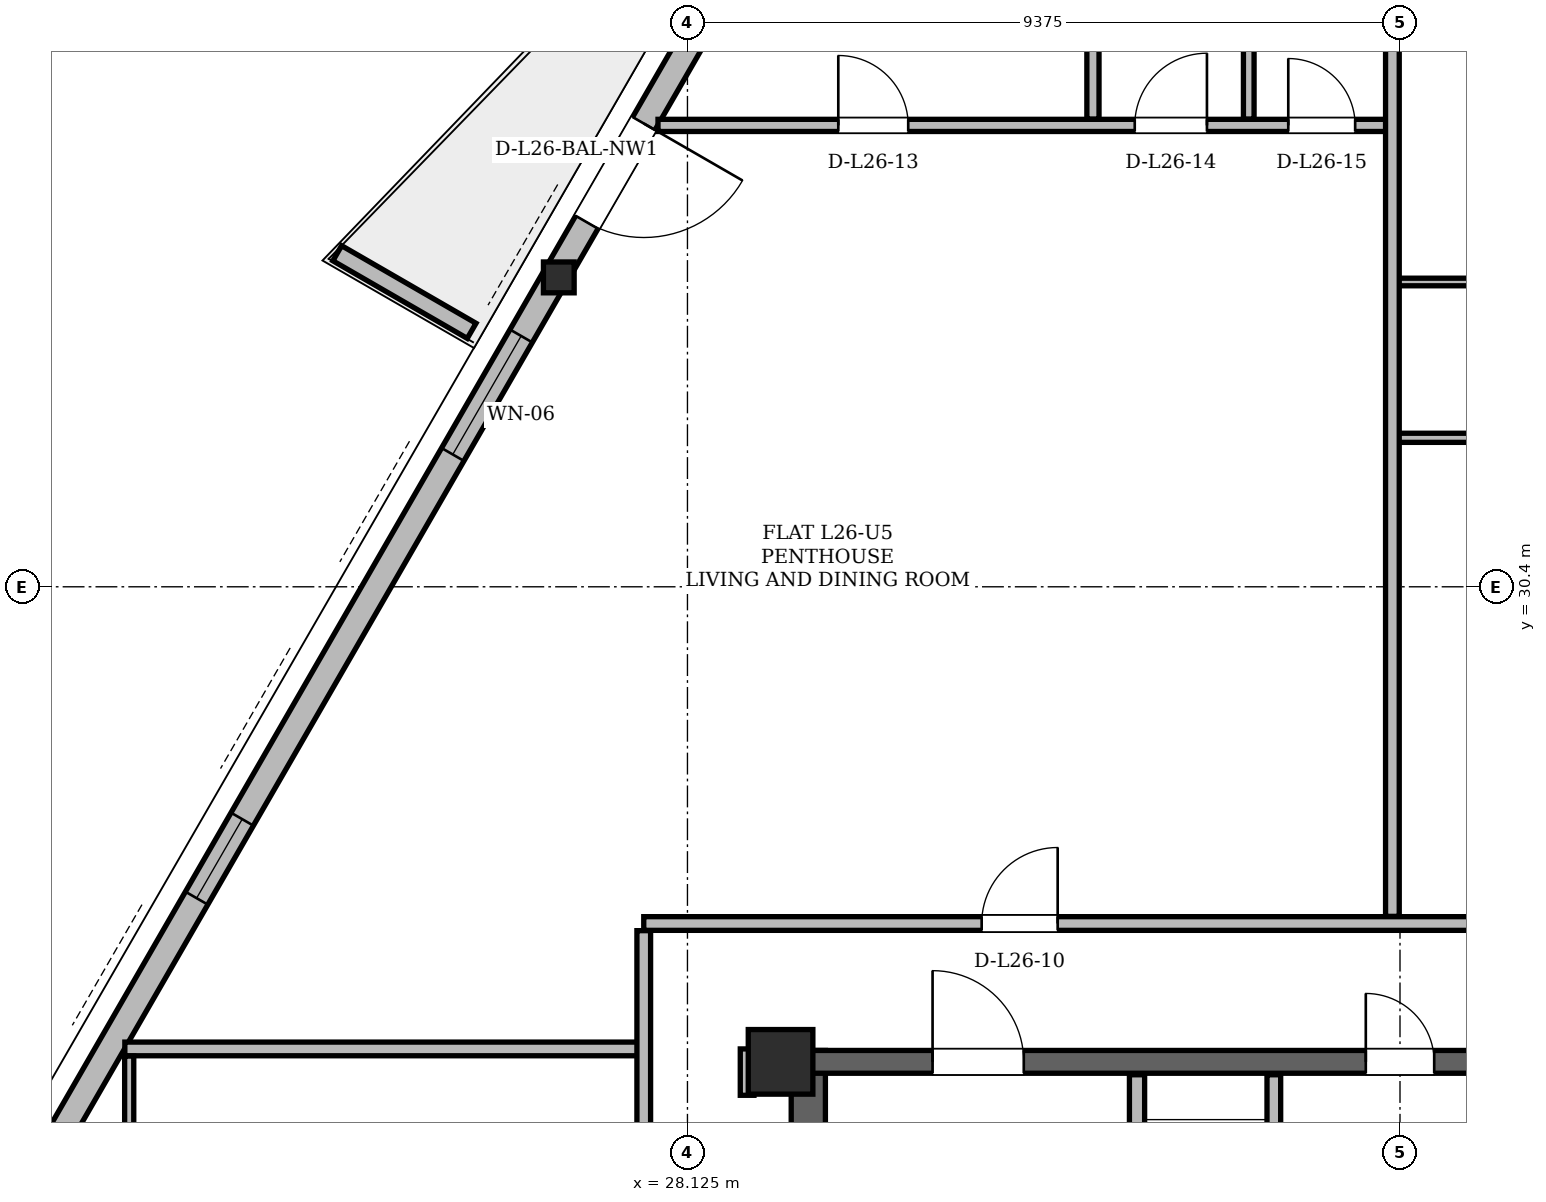
"""IFC4 building model, lengths in metres.
Left out: names, types, materials, properties, quantities, classifications, styles, units other than length and angle.
Written with IfcOpenShell. Run it as: python <this file> out.ifc"""

import sys

from ifc_helpers import new_model, si_unit, direction, frame, frame_2d, origin, origin_2d, place, context, subcontext, project, spatial, polyline, rectangle, hollow_rectangle, i_section, outline, extrude, element, fill, save


model = new_model("IFC4")
c1 = context("Model", 3, precision=1e-05, world=origin(), true_north=direction((0.0, 1.0)))
c2 = subcontext(c1, "Body", "Model", "MODEL_VIEW")
j1 = project(units=[si_unit("LENGTHUNIT", "METRE"), si_unit("PLANEANGLEUNIT", "RADIAN")], contexts=[c1])
p1 = place(None, origin())
s1 = spatial("IfcSite", under=j1, at=p1, CompositionType="ELEMENT")
p2 = place(p1, origin())
s2 = spatial("IfcBuilding", under=s1, at=p2, CompositionType="ELEMENT")
p3 = place(p2, frame((0.0, 0.0, 100.5)))
s3 = spatial("IfcBuildingStorey", under=s2, at=p3, CompositionType="ELEMENT", Elevation=100.5)
p4 = place(p3, frame((29.35, 24.15, 0.0), z_axis=(0.0, 0.0, 1.0), x_axis=(1.0, 0.0, 0.0)))
e1 = element("IfcColumn", 1, at=p4, inside=s3, PredefinedType="COLUMN", context=c2, shape_type="SweptSolid", body=[
    extrude(hollow_rectangle(XDim=0.85, YDim=0.85, WallThickness=0.07, at=origin_2d()), origin(), (0.0, 0.0, 1.0), 3.6),
])
p5 = place(p3, frame((26.391, 34.485, 0.004), z_axis=(0.023176047894, -0.00835968883, 0.999696447131), x_axis=(0.339305503404, 0.940676233015, 0.0)))
e2 = element("IfcColumn", 2, at=p5, inside=s3, PredefinedType="COLUMN", context=c2, shape_type="SweptSolid", body=[
    extrude(i_section(OverallWidth=0.404, OverallDepth=0.406, WebThickness=0.027, FlangeThickness=0.044, at=origin_2d()), origin(), (0.0, 0.0, 1.0), 3.592),
])
p6 = place(p3, frame((29.715, 11.0, 0.0), z_axis=(0.0, 0.0, 1.0), x_axis=(0.0, 1.0, 0.0)))
e3 = element("IfcWall", 3, at=p6, inside=s3, PredefinedType="SHEAR", context=c2, shape_type="SweptSolid", body=[
    extrude(rectangle(XDim=13.3, YDim=0.45, at=frame_2d((6.65, 0.0))), origin(), (0.0, 0.0, 1.0), 3.36),
])
p7 = place(p3, frame((29.65, 24.15, 0.0), z_axis=(0.0, 0.0, 1.0), x_axis=(1.0, 0.0, 0.0)))
e4 = element("IfcWall", 4, at=p7, inside=s3, PredefinedType="SHEAR", context=c2, shape_type="SweptSolid", body=[
    extrude(rectangle(XDim=15.7, YDim=0.3, at=frame_2d((7.85, 0.0))), origin(), (0.0, 0.0, 1.0), 3.36),
])
p8 = place(p7, frame((1.7, 0.0, 0.0)))
e5 = element("IfcOpeningElement", 5, at=p8, cuts=e4, PredefinedType="OPENING", context=c2, shape_type="SweptSolid", body=[
    extrude(rectangle(XDim=1.2, YDim=2.2, at=frame_2d((0.6, 1.1))), frame((0.0, 0.15, 0.0), z_axis=(0.0, -1.0, 0.0), x_axis=(1.0, 0.0, 0.0)), (0.0, 0.0, 1.0), 0.3),
])
p9 = place(p7, frame((12.8, 0.0, 0.0)))
e6 = element("IfcOpeningElement", 6, at=p9, cuts=e4, PredefinedType="OPENING", context=c2, shape_type="SweptSolid", body=[
    extrude(rectangle(XDim=1.2, YDim=2.2, at=frame_2d((0.6, 1.1))), frame((0.0, 0.15, 0.0), z_axis=(0.0, -1.0, 0.0), x_axis=(1.0, 0.0, 0.0)), (0.0, 0.0, 1.0), 0.3),
])
p10 = place(p7, frame((7.4, 0.0, 0.0)))
e7 = element("IfcOpeningElement", 7, at=p10, cuts=e4, PredefinedType="OPENING", context=c2, shape_type="SweptSolid", body=[
    extrude(rectangle(XDim=0.9, YDim=2.05, at=frame_2d((0.45, 1.025))), frame((0.0, 0.15, 0.0), z_axis=(0.0, -1.0, 0.0), x_axis=(1.0, 0.0, 0.0)), (0.0, 0.0, 1.0), 0.3),
])
p11 = place(p3, frame((31.568, 43.453, 0.0), z_axis=(0.0, 0.0, 1.0), x_axis=(-0.500002056916, -0.86602421622, 0.0)))
e8 = element("IfcWall", 8, at=p11, inside=s3, PredefinedType="SOLIDWALL", context=c2, shape_type="SweptSolid", body=[
    extrude(rectangle(XDim=34.516, YDim=0.34, at=frame_2d((17.258, 0.0))), origin(), (0.0, 0.0, 1.0), 2.578),
])
p12 = place(p11, frame((8.034, 0.0, 0.0)))
e9 = element("IfcOpeningElement", 9, at=p12, cuts=e8, PredefinedType="OPENING", context=c2, shape_type="SweptSolid", body=[
    extrude(rectangle(XDim=1.5, YDim=2.2, at=frame_2d((0.75, 1.1))), frame((0.0, 0.17, 0.0), z_axis=(0.0, -1.0, 0.0), x_axis=(1.0, 0.0, 0.0)), (0.0, 0.0, 1.0), 0.34),
])
p13 = place(p11, frame((26.647, 0.0, 0.0)))
e10 = element("IfcOpeningElement", 10, at=p13, cuts=e8, PredefinedType="OPENING", context=c2, shape_type="SweptSolid", body=[
    extrude(rectangle(XDim=1.5, YDim=2.2, at=frame_2d((0.75, 1.1))), frame((0.0, 0.17, 0.0), z_axis=(0.0, -1.0, 0.0), x_axis=(1.0, 0.0, 0.0)), (0.0, 0.0, 1.0), 0.34),
])
p14 = place(p11, frame((31.672, 0.0, 0.85)))
e11 = element("IfcOpeningElement", 11, at=p14, cuts=e8, PredefinedType="OPENING", context=c2, shape_type="SweptSolid", body=[
    extrude(rectangle(XDim=1.6, YDim=1.618, at=frame_2d((0.8, 0.809))), frame((0.0, 0.17, 0.0), z_axis=(0.0, -1.0, 0.0), x_axis=(1.0, 0.0, 0.0)), (0.0, 0.0, 1.0), 0.34),
])
p15 = place(p11, frame((11.262, 0.0, 0.85)))
e12 = element("IfcOpeningElement", 12, at=p15, cuts=e8, PredefinedType="OPENING", context=c2, shape_type="SweptSolid", body=[
    extrude(rectangle(XDim=1.8, YDim=1.618, at=frame_2d((0.9, 0.809))), frame((0.0, 0.17, 0.0), z_axis=(0.0, -1.0, 0.0), x_axis=(1.0, 0.0, 0.0)), (0.0, 0.0, 1.0), 0.34),
])
p16 = place(p11, frame((18.602, 0.0, 0.85)))
e13 = element("IfcOpeningElement", 13, at=p16, cuts=e8, PredefinedType="OPENING", context=c2, shape_type="SweptSolid", body=[
    extrude(rectangle(XDim=1.2, YDim=1.48, at=frame_2d((0.6, 0.74))), frame((0.0, 0.17, 0.0), z_axis=(0.0, -1.0, 0.0), x_axis=(1.0, 0.0, 0.0)), (0.0, 0.0, 1.0), 0.34),
])
p17 = place(p11, frame((1.763, 0.0, 0.85)))
e14 = element("IfcOpeningElement", 14, at=p17, cuts=e8, PredefinedType="OPENING", context=c2, shape_type="SweptSolid", body=[
    extrude(rectangle(XDim=1.6, YDim=1.618, at=frame_2d((0.8, 0.809))), frame((0.0, 0.17, 0.0), z_axis=(0.0, -1.0, 0.0), x_axis=(1.0, 0.0, 0.0)), (0.0, 0.0, 1.0), 0.34),
])
p18 = place(p3, frame((25.285, 33.767, 0.0), z_axis=(0.0, 0.0, 1.0), x_axis=(-0.866012356593, 0.500022597718, 0.0)))
e15 = element("IfcWall", 15, at=p18, inside=s3, PredefinedType="PARAPET", context=c2, shape_type="SweptSolid", body=[
    extrude(outline(polyline([(0.0, 0.0), (2.042, 0.0), (2.042, 1.1), (0.0, 1.32), (0.0, 0.0)])), frame((0.0, 0.115, 0.0), z_axis=(0.0, -1.0, 0.0), x_axis=(1.0, 0.0, 0.0)), (0.0, 0.0, 1.0), 0.23),
])
p19 = place(p3, frame((34.04, 19.48, 0.0), z_axis=(0.0, 0.0, 1.0), x_axis=(0.0, 1.0, 0.0)))
e16 = element("IfcWall", 16, at=p19, inside=s3, PredefinedType="PARTITIONING", context=c2, shape_type="SweptSolid", body=[
    extrude(rectangle(XDim=4.5, YDim=0.2, at=frame_2d((2.25, 0.0))), origin(), (0.0, 0.0, 1.0), 2.4),
])
p20 = place(p19, frame((2.12, 0.0, 0.0)))
e17 = element("IfcOpeningElement", 17, at=p20, cuts=e16, PredefinedType="OPENING", context=c2, shape_type="SweptSolid", body=[
    extrude(rectangle(XDim=1.1, YDim=2.2, at=frame_2d((0.55, 1.1))), frame((0.0, 0.1, 0.0), z_axis=(0.0, -1.0, 0.0), x_axis=(1.0, 0.0, 0.0)), (0.0, 0.0, 1.0), 0.2),
])
p21 = place(p3, frame((35.84, 20.96, 0.0), z_axis=(0.0, 0.0, 1.0), x_axis=(0.0, 1.0, 0.0)))
e18 = element("IfcWall", 18, at=p21, inside=s3, PredefinedType="PARTITIONING", context=c2, shape_type="SweptSolid", body=[
    extrude(rectangle(XDim=3.02, YDim=0.18, at=frame_2d((1.51, 0.0))), origin(), (0.0, 0.0, 1.0), 2.4),
])
p22 = place(p3, frame((20.723, 24.32, 0.0), z_axis=(0.0, 0.0, 1.0), x_axis=(1.0, 0.0, 0.0)))
e19 = element("IfcWall", 19, at=p22, inside=s3, PredefinedType="PARTITIONING", context=c2, shape_type="SweptSolid", body=[
    extrude(rectangle(XDim=6.887, YDim=0.18, at=frame_2d((3.444, 0.0))), origin(), (0.0, 0.0, 1.0), 3.36),
])
p23 = place(p3, frame((27.55, 25.97, 0.0), z_axis=(0.0, 0.0, 1.0), x_axis=(1.0, 0.0, 0.0)))
e20 = element("IfcWall", 20, at=p23, inside=s3, PredefinedType="PARTITIONING", context=c2, shape_type="SweptSolid", body=[
    extrude(rectangle(XDim=19.9, YDim=0.18, at=frame_2d((9.95, 0.0))), origin(), (0.0, 0.0, 1.0), 2.814),
])
p24 = place(p23, frame((4.446, 0.0, 0.0)))
e21 = element("IfcOpeningElement", 21, at=p24, cuts=e20, PredefinedType="OPENING", context=c2, shape_type="SweptSolid", body=[
    extrude(rectangle(XDim=1.0, YDim=2.18, at=frame_2d((0.5, 1.09))), frame((0.0, 0.09, 0.0), z_axis=(0.0, -1.0, 0.0), x_axis=(1.0, 0.0, 0.0)), (0.0, 0.0, 1.0), 0.18),
])
p25 = place(p23, frame((13.4, 0.0, 0.0)))
e22 = element("IfcOpeningElement", 22, at=p25, cuts=e20, PredefinedType="OPENING", context=c2, shape_type="SweptSolid", body=[
    extrude(rectangle(XDim=1.3, YDim=2.2, at=frame_2d((0.65, 1.1))), frame((0.0, 0.09, 0.0), z_axis=(0.0, -1.0, 0.0), x_axis=(1.0, 0.0, 0.0)), (0.0, 0.0, 1.0), 0.18),
])
p26 = place(p23, frame((16.99, 0.0, 0.0)))
e23 = element("IfcOpeningElement", 23, at=p26, cuts=e20, PredefinedType="OPENING", context=c2, shape_type="SweptSolid", body=[
    extrude(rectangle(XDim=1.0, YDim=2.18, at=frame_2d((0.5, 1.09))), frame((0.0, 0.09, 0.0), z_axis=(0.0, -1.0, 0.0), x_axis=(1.0, 0.0, 0.0)), (0.0, 0.0, 1.0), 0.18),
])
p27 = place(p3, frame((37.35, 32.36, 0.0), z_axis=(0.0, 0.0, 1.0), x_axis=(1.0, 0.0, 0.0)))
e24 = element("IfcWall", 24, at=p27, inside=s3, PredefinedType="PARTITIONING", context=c2, shape_type="SweptSolid", body=[
    extrude(rectangle(XDim=4.4, YDim=0.12, at=frame_2d((2.2, 0.0))), origin(), (0.0, 0.0, 1.0), 3.36),
])
p28 = place(p3, frame((37.35, 34.41, 0.0), z_axis=(0.0, 0.0, 1.0), x_axis=(1.0, 0.0, 0.0)))
e25 = element("IfcWall", 25, at=p28, inside=s3, PredefinedType="PARTITIONING", context=c2, shape_type="SweptSolid", body=[
    extrude(rectangle(XDim=4.4, YDim=0.1, at=frame_2d((2.2, 0.0))), origin(), (0.0, 0.0, 1.0), 3.36),
])
p29 = place(p3, frame((27.737, 36.47, 0.0), z_axis=(0.0, 0.0, 1.0), x_axis=(1.0, 0.0, 0.0)))
e26 = element("IfcWall", 26, at=p29, inside=s3, PredefinedType="PARTITIONING", context=c2, shape_type="SweptSolid", body=[
    extrude(rectangle(XDim=9.713, YDim=0.16, at=frame_2d((4.856, 0.0))), origin(), (0.0, 0.0, 1.0), 2.814),
])
p30 = place(p29, frame((2.372, 0.0, 0.0)))
e27 = element("IfcOpeningElement", 27, at=p30, cuts=e26, PredefinedType="OPENING", context=c2, shape_type="SweptSolid", body=[
    extrude(rectangle(XDim=0.92, YDim=2.12, at=frame_2d((0.46, 1.06))), frame((0.0, 0.08, 0.0), z_axis=(0.0, -1.0, 0.0), x_axis=(1.0, 0.0, 0.0)), (0.0, 0.0, 1.0), 0.16),
])
p31 = place(p29, frame((6.273, 0.0, 0.0)))
e28 = element("IfcOpeningElement", 28, at=p31, cuts=e26, PredefinedType="OPENING", context=c2, shape_type="SweptSolid", body=[
    extrude(rectangle(XDim=0.95, YDim=2.1, at=frame_2d((0.475, 1.05))), frame((0.0, 0.08, 0.0), z_axis=(0.0, -1.0, 0.0), x_axis=(1.0, 0.0, 0.0)), (0.0, 0.0, 1.0), 0.16),
])
p32 = place(p29, frame((8.292, 0.0, 0.0)))
e29 = element("IfcOpeningElement", 29, at=p32, cuts=e26, PredefinedType="OPENING", context=c2, shape_type="SweptSolid", body=[
    extrude(rectangle(XDim=0.88, YDim=2.08, at=frame_2d((0.44, 1.04))), frame((0.0, 0.08, 0.0), z_axis=(0.0, -1.0, 0.0), x_axis=(1.0, 0.0, 0.0)), (0.0, 0.0, 1.0), 0.16),
])
p33 = place(p3, frame((20.78, 18.494, 0.0), z_axis=(0.0, 0.0, 1.0), x_axis=(0.0, 1.0, 0.0)))
e30 = element("IfcWall", 30, at=p33, inside=s3, PredefinedType="PARTITIONING", context=c2, shape_type="SweptSolid", body=[
    extrude(rectangle(XDim=5.732, YDim=0.12, at=frame_2d((2.866, 0.0))), origin(), (0.0, 0.0, 1.0), 3.36),
])
p34 = place(p33, frame((2.426, 0.0, 0.0)))
e31 = element("IfcOpeningElement", 31, at=p34, cuts=e30, PredefinedType="OPENING", context=c2, shape_type="SweptSolid", body=[
    extrude(rectangle(XDim=0.88, YDim=2.08, at=frame_2d((0.44, 1.04))), frame((0.0, 0.06, 0.0), z_axis=(0.0, -1.0, 0.0), x_axis=(1.0, 0.0, 0.0)), (0.0, 0.0, 1.0), 0.12),
])
p35 = place(p3, frame((27.55, 11.044, 0.0), z_axis=(0.0, 0.0, 1.0), x_axis=(0.0, 1.0, 0.0)))
e32 = element("IfcWall", 32, at=p35, inside=s3, PredefinedType="PARTITIONING", context=c2, shape_type="SweptSolid", body=[
    extrude(rectangle(XDim=14.832, YDim=0.18, at=frame_2d((7.416, 0.0))), origin(), (0.0, 0.0, 1.0), 2.814),
])
p36 = place(p35, frame((9.795, 0.0, 0.0)))
e33 = element("IfcOpeningElement", 33, at=p36, cuts=e32, PredefinedType="OPENING", context=c2, shape_type="SweptSolid", body=[
    extrude(rectangle(XDim=1.0, YDim=2.18, at=frame_2d((0.5, 1.09))), frame((0.0, 0.09, 0.0), z_axis=(0.0, -1.0, 0.0), x_axis=(1.0, 0.0, 0.0)), (0.0, 0.0, 1.0), 0.18),
])
p37 = place(p3, frame((28.91, 23.71, 0.0), z_axis=(0.0, 0.0, 1.0), x_axis=(0.0, 1.0, 0.0)))
e34 = element("IfcWall", 34, at=p37, inside=s3, PredefinedType="PARTITIONING", context=c2, shape_type="SweptSolid", body=[
    extrude(rectangle(XDim=0.61, YDim=0.18, at=frame_2d((0.305, 0.0))), origin(), (0.0, 0.0, 1.0), 3.36),
])
p38 = place(p3, frame((33.46, 36.554, 0.0), z_axis=(0.0, 0.0, 1.0), x_axis=(0.0, 1.0, 0.0)))
e35 = element("IfcWall", 35, at=p38, inside=s3, PredefinedType="PARTITIONING", context=c2, shape_type="SweptSolid", body=[
    extrude(rectangle(XDim=6.725, YDim=0.16, at=frame_2d((3.363, 0.0))), origin(), (0.0, 0.0, 1.0), 3.36),
])
p39 = place(p3, frame((35.51, 36.554, 0.0), z_axis=(0.0, 0.0, 1.0), x_axis=(0.0, 1.0, 0.0)))
e36 = element("IfcWall", 36, at=p39, inside=s3, PredefinedType="PARTITIONING", context=c2, shape_type="SweptSolid", body=[
    extrude(rectangle(XDim=6.725, YDim=0.14, at=frame_2d((3.363, 0.0))), origin(), (0.0, 0.0, 1.0), 3.36),
])
p40 = place(p3, frame((37.4, 26.064, 0.0), z_axis=(0.0, 0.0, 1.0), x_axis=(0.0, 1.0, 0.0)))
e37 = element("IfcWall", 37, at=p40, inside=s3, PredefinedType="PARTITIONING", context=c2, shape_type="SweptSolid", body=[
    extrude(rectangle(XDim=17.215, YDim=0.18, at=frame_2d((8.607, 0.0))), origin(), (0.0, 0.0, 1.0), 3.36),
])
p41 = place(p12, origin())
e38 = element("IfcDoor", 38, at=p41, inside=s3, OperationType="SINGLE_SWING_LEFT", PredefinedType="DOOR", context=c2, shape_type="SweptSolid", body=[
    extrude(rectangle(XDim=1.5, YDim=2.2, at=frame_2d((0.75, 1.1))), frame((0.0, 0.025, 0.0), z_axis=(0.0, -1.0, 0.0), x_axis=(1.0, 0.0, 0.0)), (0.0, 0.0, 1.0), 0.05),
])
fill(e9, e38)
p42 = place(p15, origin())
e39 = element("IfcWindow", 39, at=p42, inside=s3, PartitioningType="SINGLE_PANEL", PredefinedType="WINDOW", context=c2, shape_type="SweptSolid", body=[
    extrude(rectangle(XDim=1.8, YDim=1.618, at=frame_2d((0.9, 0.809))), frame((0.0, 0.03, 0.0), z_axis=(0.0, -1.0, 0.0), x_axis=(1.0, 0.0, 0.0)), (0.0, 0.0, 1.0), 0.06),
])
fill(e12, e39)
p43 = place(p16, origin())
e40 = element("IfcWindow", 40, at=p43, inside=s3, PartitioningType="SINGLE_PANEL", PredefinedType="WINDOW", context=c2, shape_type="SweptSolid", body=[
    extrude(rectangle(XDim=1.2, YDim=1.48, at=frame_2d((0.6, 0.74))), frame((0.0, 0.03, 0.0), z_axis=(0.0, -1.0, 0.0), x_axis=(1.0, 0.0, 0.0)), (0.0, 0.0, 1.0), 0.06),
])
fill(e13, e40)
p44 = place(p8, origin())
e41 = element("IfcDoor", 41, at=p44, inside=s3, OperationType="SINGLE_SWING_LEFT", PredefinedType="DOOR", context=c2, shape_type="SweptSolid", body=[
    extrude(rectangle(XDim=1.2, YDim=2.2, at=frame_2d((0.6, 1.1))), frame((0.0, 0.025, 0.0), z_axis=(0.0, -1.0, 0.0), x_axis=(1.0, 0.0, 0.0)), (0.0, 0.0, 1.0), 0.05),
])
fill(e5, e41)
p45 = place(p10, origin())
e42 = element("IfcDoor", 42, at=p45, inside=s3, OperationType="SINGLE_SWING_LEFT", PredefinedType="DOOR", context=c2, shape_type="SweptSolid", body=[
    extrude(rectangle(XDim=0.9, YDim=2.05, at=frame_2d((0.45, 1.025))), frame((0.0, 0.025, 0.0), z_axis=(0.0, -1.0, 0.0), x_axis=(1.0, 0.0, 0.0)), (0.0, 0.0, 1.0), 0.05),
])
fill(e7, e42)
p46 = place(p24, origin())
e43 = element("IfcDoor", 43, at=p46, inside=s3, OperationType="SINGLE_SWING_RIGHT", PredefinedType="DOOR", context=c2, shape_type="SweptSolid", body=[
    extrude(rectangle(XDim=1.0, YDim=2.18, at=frame_2d((0.5, 1.09))), frame((0.0, 0.025, 0.0), z_axis=(0.0, -1.0, 0.0), x_axis=(1.0, 0.0, 0.0)), (0.0, 0.0, 1.0), 0.05),
])
fill(e21, e43)
p47 = place(p30, origin())
e44 = element("IfcDoor", 44, at=p47, inside=s3, OperationType="SINGLE_SWING_LEFT", PredefinedType="DOOR", context=c2, shape_type="SweptSolid", body=[
    extrude(rectangle(XDim=0.92, YDim=2.12, at=frame_2d((0.46, 1.06))), frame((0.0, 0.025, 0.0), z_axis=(0.0, -1.0, 0.0), x_axis=(1.0, 0.0, 0.0)), (0.0, 0.0, 1.0), 0.05),
])
fill(e27, e44)
p48 = place(p31, origin())
e45 = element("IfcDoor", 45, at=p48, inside=s3, OperationType="SINGLE_SWING_RIGHT", PredefinedType="DOOR", context=c2, shape_type="SweptSolid", body=[
    extrude(rectangle(XDim=0.95, YDim=2.1, at=frame_2d((0.475, 1.05))), frame((0.0, 0.025, 0.0), z_axis=(0.0, -1.0, 0.0), x_axis=(1.0, 0.0, 0.0)), (0.0, 0.0, 1.0), 0.05),
])
fill(e28, e45)
p49 = place(p32, origin())
e46 = element("IfcDoor", 46, at=p49, inside=s3, OperationType="SINGLE_SWING_LEFT", PredefinedType="DOOR", context=c2, shape_type="SweptSolid", body=[
    extrude(rectangle(XDim=0.88, YDim=2.08, at=frame_2d((0.44, 1.04))), frame((0.0, 0.025, 0.0), z_axis=(0.0, -1.0, 0.0), x_axis=(1.0, 0.0, 0.0)), (0.0, 0.0, 1.0), 0.05),
])
fill(e29, e46)
save(model, sys.argv[1])
